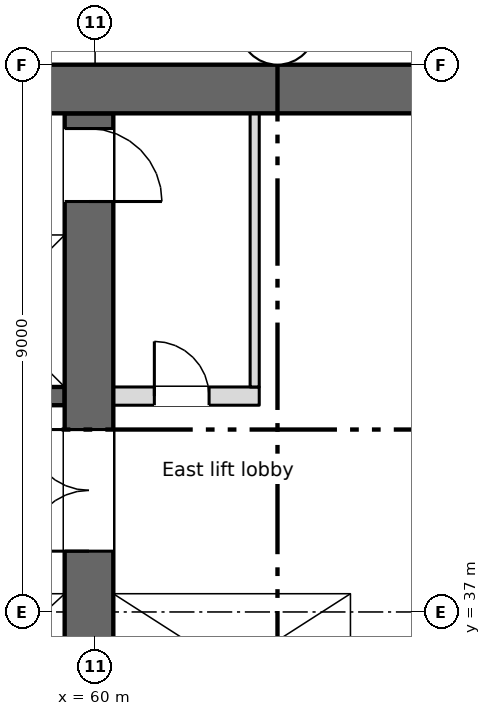
"""IFC4 building model, lengths in metres.
Left out: names, types, materials, properties, quantities, classifications, styles, units other than length and angle.
Written with IfcOpenShell. Run it as: python <this file> out.ifc"""

import sys

from ifc_helpers import new_model, si_unit, direction, frame, frame_2d, origin, place, context, subcontext, project, spatial, rectangle, extrude, element, fill, save


model = new_model("IFC4")
c1 = context("Model", 3, precision=1e-05, world=origin(), true_north=direction((0.0, 1.0)))
c2 = subcontext(c1, "Body", "Model", "MODEL_VIEW")
j1 = project(units=[si_unit("LENGTHUNIT", "METRE"), si_unit("PLANEANGLEUNIT", "RADIAN")], contexts=[c1])
p1 = place(None, origin())
s1 = spatial("IfcSite", under=j1, at=p1, CompositionType="ELEMENT")
p2 = place(p1, origin())
s2 = spatial("IfcBuilding", under=s1, at=p2, CompositionType="ELEMENT")
p3 = place(p2, frame((0.0, 0.0, 143.75)))
s3 = spatial("IfcBuildingStorey", under=s2, at=p3, CompositionType="ELEMENT", Elevation=143.75)
p4 = place(p3, frame((5.55, 45.6, 0.0), z_axis=(0.0, 0.0, 1.0), x_axis=(1.0, 0.0, 0.0)))
e1 = element("IfcWall", 1, at=p4, inside=s3, PredefinedType="SHEAR", context=c2, shape_type="SweptSolid", body=[
    extrude(rectangle(XDim=60.9, YDim=0.8, at=frame_2d((30.45, 0.0))), origin(), (0.0, 0.0, 1.0), 3.35),
])
p5 = place(p4, frame((1.2, 0.0, 0.6)))
e2 = element("IfcOpeningElement", 2, at=p5, cuts=e1, PredefinedType="OPENING", context=c2, shape_type="SweptSolid", body=[
    extrude(rectangle(XDim=0.6, YDim=2.4, at=frame_2d((0.3, 1.2))), frame((0.0, 0.41, 0.0), z_axis=(0.0, -1.0, 0.0), x_axis=(1.0, 0.0, 0.0)), (0.0, 0.0, 1.0), 0.82),
])
p6 = place(p4, frame((7.2, 0.0, 0.6)))
e3 = element("IfcOpeningElement", 3, at=p6, cuts=e1, PredefinedType="OPENING", context=c2, shape_type="SweptSolid", body=[
    extrude(rectangle(XDim=0.6, YDim=2.4, at=frame_2d((0.3, 1.2))), frame((0.0, 0.41, 0.0), z_axis=(0.0, -1.0, 0.0), x_axis=(1.0, 0.0, 0.0)), (0.0, 0.0, 1.0), 0.82),
])
p7 = place(p3, frame((64.35, 34.8, 0.0), z_axis=(0.0, 0.0, 1.0), x_axis=(0.0, 1.0, 0.0)))
e4 = element("IfcWall", 4, at=p7, inside=s3, PredefinedType="SHEAR", context=c2, shape_type="SweptSolid", body=[
    extrude(rectangle(XDim=10.4, YDim=0.3, at=frame_2d((5.2, 0.0))), origin(), (0.0, 0.0, 1.0), 3.35),
])
p8 = place(p3, frame((59.9, 28.4, 0.0), z_axis=(0.0, 0.0, 1.0), x_axis=(0.0, 1.0, 0.0)))
e5 = element("IfcWall", 5, at=p8, inside=s3, PredefinedType="SHEAR", context=c2, shape_type="SweptSolid", body=[
    extrude(rectangle(XDim=16.8, YDim=0.8, at=frame_2d((8.4, 0.0))), origin(), (0.0, 0.0, 1.0), 3.35),
])
p9 = place(p8, frame((9.6, 0.0, 0.0)))
e6 = element("IfcOpeningElement", 6, at=p9, cuts=e5, PredefinedType="OPENING", context=c2, shape_type="SweptSolid", body=[
    extrude(rectangle(XDim=2.0, YDim=2.1, at=frame_2d((1.0, 1.05))), frame((0.0, 0.41, 0.0), z_axis=(0.0, -1.0, 0.0), x_axis=(1.0, 0.0, 0.0)), (0.0, 0.0, 1.0), 0.82),
])
p10 = place(p8, frame((15.35, 0.0, 0.0)))
e7 = element("IfcOpeningElement", 7, at=p10, cuts=e5, PredefinedType="OPENING", context=c2, shape_type="SweptSolid", body=[
    extrude(rectangle(XDim=1.2, YDim=2.1, at=frame_2d((0.6, 1.05))), frame((0.0, 0.41, 0.0), z_axis=(0.0, -1.0, 0.0), x_axis=(1.0, 0.0, 0.0)), (0.0, 0.0, 1.0), 0.82),
])
p11 = place(p3, frame((47.3, 37.45, 0.0), z_axis=(0.0, 0.0, 1.0), x_axis=(1.0, 0.0, 0.0)))
e8 = element("IfcWall", 8, at=p11, inside=s3, PredefinedType="SHEAR", context=c2, shape_type="SweptSolid", body=[
    extrude(rectangle(XDim=12.2, YDim=0.3, at=frame_2d((6.1, 0.0))), origin(), (0.0, 0.0, 1.0), 3.35),
])
p12 = place(p11, frame((4.3, 0.0, 0.0)))
e9 = element("IfcOpeningElement", 9, at=p12, cuts=e8, PredefinedType="OPENING", context=c2, shape_type="SweptSolid", body=[
    extrude(rectangle(XDim=1.1, YDim=2.1, at=frame_2d((0.55, 1.05))), frame((0.0, 0.16, 0.0), z_axis=(0.0, -1.0, 0.0), x_axis=(1.0, 0.0, 0.0)), (0.0, 0.0, 1.0), 0.32),
])
p13 = place(p11, frame((7.3, 0.0, 0.0)))
e10 = element("IfcOpeningElement", 10, at=p13, cuts=e8, PredefinedType="OPENING", context=c2, shape_type="SweptSolid", body=[
    extrude(rectangle(XDim=1.1, YDim=2.1, at=frame_2d((0.55, 1.05))), frame((0.0, 0.16, 0.0), z_axis=(0.0, -1.0, 0.0), x_axis=(1.0, 0.0, 0.0)), (0.0, 0.0, 1.0), 0.32),
])
p14 = place(p11, frame((10.3, 0.0, 0.0)))
e11 = element("IfcOpeningElement", 11, at=p14, cuts=e8, PredefinedType="OPENING", context=c2, shape_type="SweptSolid", body=[
    extrude(rectangle(XDim=1.1, YDim=2.1, at=frame_2d((0.55, 1.05))), frame((0.0, 0.16, 0.0), z_axis=(0.0, -1.0, 0.0), x_axis=(1.0, 0.0, 0.0)), (0.0, 0.0, 1.0), 0.32),
])
p15 = place(p3, frame((60.3, 37.45, 0.0), z_axis=(0.0, 0.0, 1.0), x_axis=(1.0, 0.0, 0.0)))
e12 = element("IfcWall", 12, at=p15, inside=s3, PredefinedType="SHEAR", context=c2, shape_type="SweptSolid", body=[
    extrude(rectangle(XDim=3.9, YDim=0.3, at=frame_2d((1.95, 0.0))), origin(), (0.0, 0.0, 1.0), 3.35),
])
p16 = place(p15, frame((1.4, 0.0, 0.0)))
e13 = element("IfcOpeningElement", 13, at=p16, cuts=e12, PredefinedType="OPENING", context=c2, shape_type="SweptSolid", body=[
    extrude(rectangle(XDim=1.1, YDim=2.1, at=frame_2d((0.55, 1.05))), frame((0.0, 0.16, 0.0), z_axis=(0.0, -1.0, 0.0), x_axis=(1.0, 0.0, 0.0)), (0.0, 0.0, 1.0), 0.32),
])
p17 = place(p3, frame((18.5, 40.55, 0.0), z_axis=(0.0, 0.0, 1.0), x_axis=(1.0, 0.0, 0.0)))
e14 = element("IfcWall", 14, at=p17, inside=s3, PredefinedType="SHEAR", context=c2, shape_type="SweptSolid", body=[
    extrude(rectangle(XDim=41.0, YDim=0.3, at=frame_2d((20.5, 0.0))), origin(), (0.0, 0.0, 1.0), 3.35),
])
p18 = place(p17, frame((18.65, 0.0, 0.0)))
e15 = element("IfcOpeningElement", 15, at=p18, cuts=e14, PredefinedType="OPENING", context=c2, shape_type="SweptSolid", body=[
    extrude(rectangle(XDim=0.9, YDim=2.1, at=frame_2d((0.45, 1.05))), frame((0.0, 0.16, 0.0), z_axis=(0.0, -1.0, 0.0), x_axis=(1.0, 0.0, 0.0)), (0.0, 0.0, 1.0), 0.32),
])
p19 = place(p17, frame((6.175, 0.0, 0.0)))
e16 = element("IfcOpeningElement", 16, at=p19, cuts=e14, PredefinedType="OPENING", context=c2, shape_type="SweptSolid", body=[
    extrude(rectangle(XDim=1.1, YDim=2.1, at=frame_2d((0.55, 1.05))), frame((0.0, 0.16, 0.0), z_axis=(0.0, -1.0, 0.0), x_axis=(1.0, 0.0, 0.0)), (0.0, 0.0, 1.0), 0.32),
])
p20 = place(p17, frame((8.925, 0.0, 0.0)))
e17 = element("IfcOpeningElement", 17, at=p20, cuts=e14, PredefinedType="OPENING", context=c2, shape_type="SweptSolid", body=[
    extrude(rectangle(XDim=1.1, YDim=2.1, at=frame_2d((0.55, 1.05))), frame((0.0, 0.16, 0.0), z_axis=(0.0, -1.0, 0.0), x_axis=(1.0, 0.0, 0.0)), (0.0, 0.0, 1.0), 0.32),
])
p21 = place(p17, frame((11.675, 0.0, 0.0)))
e18 = element("IfcOpeningElement", 18, at=p21, cuts=e14, PredefinedType="OPENING", context=c2, shape_type="SweptSolid", body=[
    extrude(rectangle(XDim=1.1, YDim=2.1, at=frame_2d((0.55, 1.05))), frame((0.0, 0.16, 0.0), z_axis=(0.0, -1.0, 0.0), x_axis=(1.0, 0.0, 0.0)), (0.0, 0.0, 1.0), 0.32),
])
p22 = place(p17, frame((30.925, 0.0, 0.0)))
e19 = element("IfcOpeningElement", 19, at=p22, cuts=e14, PredefinedType="OPENING", context=c2, shape_type="SweptSolid", body=[
    extrude(rectangle(XDim=1.1, YDim=2.1, at=frame_2d((0.55, 1.05))), frame((0.0, 0.16, 0.0), z_axis=(0.0, -1.0, 0.0), x_axis=(1.0, 0.0, 0.0)), (0.0, 0.0, 1.0), 0.32),
])
p23 = place(p17, frame((33.675, 0.0, 0.0)))
e20 = element("IfcOpeningElement", 20, at=p23, cuts=e14, PredefinedType="OPENING", context=c2, shape_type="SweptSolid", body=[
    extrude(rectangle(XDim=1.1, YDim=2.1, at=frame_2d((0.55, 1.05))), frame((0.0, 0.16, 0.0), z_axis=(0.0, -1.0, 0.0), x_axis=(1.0, 0.0, 0.0)), (0.0, 0.0, 1.0), 0.32),
])
p24 = place(p17, frame((36.375, 0.0, 0.0)))
e21 = element("IfcOpeningElement", 21, at=p24, cuts=e14, PredefinedType="OPENING", context=c2, shape_type="SweptSolid", body=[
    extrude(rectangle(XDim=1.2, YDim=2.1, at=frame_2d((0.6, 1.05))), frame((0.0, 0.16, 0.0), z_axis=(0.0, -1.0, 0.0), x_axis=(1.0, 0.0, 0.0)), (0.0, 0.0, 1.0), 0.32),
])
p25 = place(p17, frame((39.15, 0.0, 0.0)))
e22 = element("IfcOpeningElement", 22, at=p25, cuts=e14, PredefinedType="OPENING", context=c2, shape_type="SweptSolid", body=[
    extrude(rectangle(XDim=1.2, YDim=2.1, at=frame_2d((0.6, 1.05))), frame((0.0, 0.16, 0.0), z_axis=(0.0, -1.0, 0.0), x_axis=(1.0, 0.0, 0.0)), (0.0, 0.0, 1.0), 0.32),
])
p26 = place(p3, frame((18.5, 43.35, 0.0), z_axis=(0.0, 0.0, 1.0), x_axis=(1.0, 0.0, 0.0)))
e23 = element("IfcWall", 23, at=p26, inside=s3, PredefinedType="SHEAR", context=c2, shape_type="SweptSolid", body=[
    extrude(rectangle(XDim=41.0, YDim=0.3, at=frame_2d((20.5, 0.0))), origin(), (0.0, 0.0, 1.0), 3.35),
])
p27 = place(p3, frame((60.3, 40.55, 0.0), z_axis=(0.0, 0.0, 1.0), x_axis=(1.0, 0.0, 0.0)))
e24 = element("IfcWall", 24, at=p27, inside=s3, PredefinedType="PARTITIONING", context=c2, shape_type="SweptSolid", body=[
    extrude(rectangle(XDim=2.4, YDim=0.3, at=frame_2d((1.2, 0.0))), origin(), (0.0, 0.0, 1.0), 3.35),
])
p28 = place(p27, frame((0.675, 0.0, 0.0)))
e25 = element("IfcOpeningElement", 25, at=p28, cuts=e24, PredefinedType="OPENING", context=c2, shape_type="SweptSolid", body=[
    extrude(rectangle(XDim=0.9, YDim=2.1, at=frame_2d((0.45, 1.05))), frame((0.0, 0.16, 0.0), z_axis=(0.0, -1.0, 0.0), x_axis=(1.0, 0.0, 0.0)), (0.0, 0.0, 1.0), 0.32),
])
p29 = place(p3, frame((62.625, 40.7, 0.0), z_axis=(0.0, 0.0, 1.0), x_axis=(0.0, 1.0, 0.0)))
e26 = element("IfcWall", 26, at=p29, inside=s3, PredefinedType="PARTITIONING", context=c2, shape_type="SweptSolid", body=[
    extrude(rectangle(XDim=4.5, YDim=0.15, at=frame_2d((2.25, 0.0))), origin(), (0.0, 0.0, 1.0), 3.35),
])
p30 = place(p28, origin())
e27 = element("IfcDoor", 27, at=p30, inside=s3, OperationType="SINGLE_SWING_LEFT", PredefinedType="DOOR", context=c2, shape_type="SweptSolid", body=[
    extrude(rectangle(XDim=0.9, YDim=2.1, at=frame_2d((0.45, 1.05))), frame((0.0, 0.025, 0.0), z_axis=(0.0, -1.0, 0.0), x_axis=(1.0, 0.0, 0.0)), (0.0, 0.0, 1.0), 0.05),
])
fill(e25, e27)
p31 = place(p16, origin())
e28 = element("IfcDoor", 28, at=p31, inside=s3, OperationType="SLIDING_TO_LEFT", PredefinedType="DOOR", context=c2, shape_type="SweptSolid", body=[
    extrude(rectangle(XDim=1.1, YDim=2.1, at=frame_2d((0.55, 1.05))), frame((0.0, 0.025, 0.0), z_axis=(0.0, -1.0, 0.0), x_axis=(1.0, 0.0, 0.0)), (0.0, 0.0, 1.0), 0.05),
])
fill(e13, e28)
p32 = place(p9, origin())
e29 = element("IfcDoor", 29, at=p32, inside=s3, OperationType="DOUBLE_DOOR_SINGLE_SWING", PredefinedType="DOOR", context=c2, shape_type="SweptSolid", body=[
    extrude(rectangle(XDim=2.0, YDim=2.1, at=frame_2d((1.0, 1.05))), frame((0.0, 0.025, 0.0), z_axis=(0.0, -1.0, 0.0), x_axis=(1.0, 0.0, 0.0)), (0.0, 0.0, 1.0), 0.05),
])
fill(e6, e29)
p33 = place(p10, origin())
e30 = element("IfcDoor", 30, at=p33, inside=s3, OperationType="SINGLE_SWING_LEFT", PredefinedType="DOOR", context=c2, shape_type="SweptSolid", body=[
    extrude(rectangle(XDim=1.2, YDim=2.1, at=frame_2d((0.6, 1.05))), frame((0.0, 0.025, 0.0), z_axis=(0.0, -1.0, 0.0), x_axis=(1.0, 0.0, 0.0)), (0.0, 0.0, 1.0), 0.05),
])
fill(e7, e30)
save(model, sys.argv[1])
